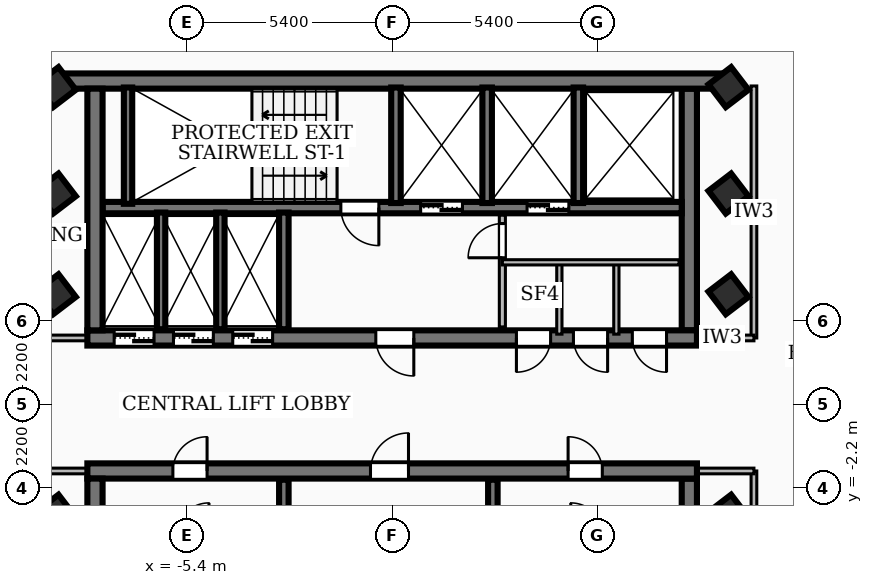
"""IFC4 building model, lengths in metres.
Left out: names, types, materials, properties, quantities, classifications, styles, units other than length and angle.
Written with IfcOpenShell. Run it as: python <this file> out.ifc"""

import sys

from ifc_helpers import new_model, si_unit, direction, frame, frame_2d, origin, origin_2d, place, context, subcontext, project, spatial, rectangle, extrude, element, fill, save


model = new_model("IFC4")
c1 = context("Model", 3, precision=1e-05, world=origin(), true_north=direction((0.0, 1.0)))
c2 = subcontext(c1, "Body", "Model", "MODEL_VIEW")
j1 = project(units=[si_unit("LENGTHUNIT", "METRE"), si_unit("PLANEANGLEUNIT", "RADIAN")], contexts=[c1])
p1 = place(None, origin())
s1 = spatial("IfcSite", under=j1, at=p1, CompositionType="ELEMENT")
p2 = place(p1, origin())
s2 = spatial("IfcBuilding", under=s1, at=p2, CompositionType="ELEMENT")
p3 = place(p2, frame((0.0, 0.0, 232.56)))
s3 = spatial("IfcBuildingStorey", under=s2, at=p3, CompositionType="ELEMENT", Elevation=232.56)
p4 = place(p3, frame((-8.78, 8.51, 0.0), z_axis=(0.0, 0.0, 1.0), x_axis=(1.0, 0.0, 0.0)))
e1 = element("IfcWall", 1, at=p4, inside=s3, PredefinedType="SHEAR", context=c2, shape_type="SweptSolid", body=[
    extrude(rectangle(XDim=17.56, YDim=0.4, at=frame_2d((8.78, 0.0))), origin(), (0.0, 0.0, 1.0), 3.14),
])
p5 = place(p3, frame((8.02, 1.75, 0.0), z_axis=(0.0, 0.0, 1.0), x_axis=(-1.0, 0.0, 0.0)))
e2 = element("IfcWall", 2, at=p5, inside=s3, PredefinedType="SHEAR", context=c2, shape_type="SweptSolid", body=[
    extrude(rectangle(XDim=16.04, YDim=0.4, at=frame_2d((8.02, 0.0))), origin(), (0.0, 0.0, 1.0), 3.14),
])
p6 = place(p5, frame((7.45, 0.0, 0.0)))
e3 = element("IfcOpeningElement", 3, at=p6, cuts=e2, PredefinedType="OPENING", context=c2, shape_type="SweptSolid", body=[
    extrude(rectangle(XDim=1.0, YDim=2.1, at=frame_2d((0.5, 1.05))), frame((0.0, 0.21, 0.0), z_axis=(0.0, -1.0, 0.0), x_axis=(1.0, 0.0, 0.0)), (0.0, 0.0, 1.0), 0.42),
])
p7 = place(p5, frame((14.285, 0.0, 0.0)))
e4 = element("IfcOpeningElement", 4, at=p7, cuts=e2, PredefinedType="OPENING", context=c2, shape_type="SweptSolid", body=[
    extrude(rectangle(XDim=1.05, YDim=2.15, at=frame_2d((0.525, 1.075))), frame((0.0, 0.21, 0.0), z_axis=(0.0, -1.0, 0.0), x_axis=(1.0, 0.0, 0.0)), (0.0, 0.0, 1.0), 0.42),
])
p8 = place(p5, frame((12.725, 0.0, 0.0)))
e5 = element("IfcOpeningElement", 5, at=p8, cuts=e2, PredefinedType="OPENING", context=c2, shape_type="SweptSolid", body=[
    extrude(rectangle(XDim=1.05, YDim=2.15, at=frame_2d((0.525, 1.075))), frame((0.0, 0.21, 0.0), z_axis=(0.0, -1.0, 0.0), x_axis=(1.0, 0.0, 0.0)), (0.0, 0.0, 1.0), 0.42),
])
p9 = place(p5, frame((11.165, 0.0, 0.0)))
e6 = element("IfcOpeningElement", 6, at=p9, cuts=e2, PredefinedType="OPENING", context=c2, shape_type="SweptSolid", body=[
    extrude(rectangle(XDim=1.05, YDim=2.15, at=frame_2d((0.525, 1.075))), frame((0.0, 0.21, 0.0), z_axis=(0.0, -1.0, 0.0), x_axis=(1.0, 0.0, 0.0)), (0.0, 0.0, 1.0), 0.42),
])
p10 = place(p5, frame((3.85, 0.0, 0.0)))
e7 = element("IfcOpeningElement", 7, at=p10, cuts=e2, PredefinedType="OPENING", context=c2, shape_type="SweptSolid", body=[
    extrude(rectangle(XDim=0.9, YDim=2.06, at=frame_2d((0.45, 1.03))), frame((0.0, 0.21, 0.0), z_axis=(0.0, -1.0, 0.0), x_axis=(1.0, 0.0, 0.0)), (0.0, 0.0, 1.0), 0.42),
])
p11 = place(p5, frame((2.35, 0.0, 0.0)))
e8 = element("IfcOpeningElement", 8, at=p11, cuts=e2, PredefinedType="OPENING", context=c2, shape_type="SweptSolid", body=[
    extrude(rectangle(XDim=0.9, YDim=2.06, at=frame_2d((0.45, 1.03))), frame((0.0, 0.21, 0.0), z_axis=(0.0, -1.0, 0.0), x_axis=(1.0, 0.0, 0.0)), (0.0, 0.0, 1.0), 0.42),
])
p12 = place(p5, frame((0.8, 0.0, 0.0)))
e9 = element("IfcOpeningElement", 9, at=p12, cuts=e2, PredefinedType="OPENING", context=c2, shape_type="SweptSolid", body=[
    extrude(rectangle(XDim=0.9, YDim=2.06, at=frame_2d((0.45, 1.03))), frame((0.0, 0.21, 0.0), z_axis=(0.0, -1.0, 0.0), x_axis=(1.0, 0.0, 0.0)), (0.0, 0.0, 1.0), 0.42),
])
for number, where, z_axis, x_axis in (
    (10, (-7.82, 1.95, 0.0), (0.0, 0.0, 1.0), (0.0, 1.0, 0.0)),
    (11, (7.82, 8.31, 0.0), (0.0, 0.0, 1.0), (0.0, -1.0, 0.0)),
):
    element("IfcWall", number, at=place(p3, frame(where, z_axis=z_axis, x_axis=x_axis)), inside=s3, PredefinedType="SHEAR", context=c2, shape_type="SweptSolid", body=[
        extrude(rectangle(XDim=6.36, YDim=0.4, at=frame_2d((3.18, 0.0))), origin(), (0.0, 0.0, 1.0), 3.14),
    ])
p13 = place(p3, frame((7.62, 5.18, 0.0), z_axis=(0.0, 0.0, 1.0), x_axis=(-1.0, 0.0, 0.0)))
e12 = element("IfcWall", 12, at=p13, inside=s3, PredefinedType="SOLIDWALL", context=c2, shape_type="SweptSolid", body=[
    extrude(rectangle(XDim=15.24, YDim=0.3, at=frame_2d((7.62, 0.0))), origin(), (0.0, 0.0, 1.0), 3.14),
])
p14 = place(p13, frame((5.77, 0.0, 0.0)))
e13 = element("IfcOpeningElement", 13, at=p14, cuts=e12, PredefinedType="OPENING", context=c2, shape_type="SweptSolid", body=[
    extrude(rectangle(XDim=1.1, YDim=2.15, at=frame_2d((0.55, 1.075))), frame((0.0, 0.16, 0.0), z_axis=(0.0, -1.0, 0.0), x_axis=(1.0, 0.0, 0.0)), (0.0, 0.0, 1.0), 0.32),
])
p15 = place(p13, frame((2.97, 0.0, 0.0)))
e14 = element("IfcOpeningElement", 14, at=p15, cuts=e12, PredefinedType="OPENING", context=c2, shape_type="SweptSolid", body=[
    extrude(rectangle(XDim=1.1, YDim=2.15, at=frame_2d((0.55, 1.075))), frame((0.0, 0.16, 0.0), z_axis=(0.0, -1.0, 0.0), x_axis=(1.0, 0.0, 0.0)), (0.0, 0.0, 1.0), 0.32),
])
p16 = place(p13, frame((7.97, 0.0, 0.0)))
e15 = element("IfcOpeningElement", 15, at=p16, cuts=e12, PredefinedType="OPENING", context=c2, shape_type="SweptSolid", body=[
    extrude(rectangle(XDim=1.0, YDim=2.1, at=frame_2d((0.5, 1.05))), frame((0.0, 0.16, 0.0), z_axis=(0.0, -1.0, 0.0), x_axis=(1.0, 0.0, 0.0)), (0.0, 0.0, 1.0), 0.32),
])
p17 = place(p3, frame((-8.02, -1.75, 0.0), z_axis=(0.0, 0.0, 1.0), x_axis=(1.0, 0.0, 0.0)))
e16 = element("IfcWall", 16, at=p17, inside=s3, PredefinedType="SHEAR", context=c2, shape_type="SweptSolid", body=[
    extrude(rectangle(XDim=16.04, YDim=0.4, at=frame_2d((8.02, 0.0))), origin(), (0.0, 0.0, 1.0), 3.14),
])
p18 = place(p17, frame((7.45, 0.0, 0.0)))
e17 = element("IfcOpeningElement", 17, at=p18, cuts=e16, PredefinedType="OPENING", context=c2, shape_type="SweptSolid", body=[
    extrude(rectangle(XDim=1.0, YDim=2.1, at=frame_2d((0.5, 1.05))), frame((0.0, 0.21, 0.0), z_axis=(0.0, -1.0, 0.0), x_axis=(1.0, 0.0, 0.0)), (0.0, 0.0, 1.0), 0.42),
])
p19 = place(p17, frame((12.65, 0.0, 0.0)))
e18 = element("IfcOpeningElement", 18, at=p19, cuts=e16, PredefinedType="OPENING", context=c2, shape_type="SweptSolid", body=[
    extrude(rectangle(XDim=0.9, YDim=2.06, at=frame_2d((0.45, 1.03))), frame((0.0, 0.21, 0.0), z_axis=(0.0, -1.0, 0.0), x_axis=(1.0, 0.0, 0.0)), (0.0, 0.0, 1.0), 0.42),
])
p20 = place(p17, frame((2.25, 0.0, 0.0)))
e19 = element("IfcOpeningElement", 19, at=p20, cuts=e16, PredefinedType="OPENING", context=c2, shape_type="SweptSolid", body=[
    extrude(rectangle(XDim=0.9, YDim=2.06, at=frame_2d((0.45, 1.03))), frame((0.0, 0.21, 0.0), z_axis=(0.0, -1.0, 0.0), x_axis=(1.0, 0.0, 0.0)), (0.0, 0.0, 1.0), 0.42),
])
for number, where, z_axis, x_axis in (
    (20, (-7.82, -8.31, 0.0), (0.0, 0.0, 1.0), (0.0, 1.0, 0.0)),
    (21, (7.82, -1.95, 0.0), (0.0, 0.0, 1.0), (0.0, -1.0, 0.0)),
):
    element("IfcWall", number, at=place(p3, frame(where, z_axis=z_axis, x_axis=x_axis)), inside=s3, PredefinedType="SHEAR", context=c2, shape_type="SweptSolid", body=[
        extrude(rectangle(XDim=6.36, YDim=0.4, at=frame_2d((3.18, 0.0))), origin(), (0.0, 0.0, 1.0), 3.14),
    ])
p21 = place(p3, frame((-6.95, 5.28, 0.0), z_axis=(0.0, 0.0, 1.0), x_axis=(0.0, 1.0, 0.0)))
e22 = element("IfcWall", 22, at=p21, inside=s3, PredefinedType="SOLIDWALL", context=c2, shape_type="SweptSolid", body=[
    extrude(rectangle(XDim=3.06, YDim=0.22, at=frame_2d((1.53, 0.0))), origin(), (0.0, 0.0, 1.0), 3.14),
])
for number, where, z_axis, x_axis in (
    (23, (0.1, 5.3, 0.0), (0.0, 0.0, 1.0), (0.0, 1.0, 0.0)),
    (24, (2.5, 5.3, 0.0), (0.0, 0.0, 1.0), (0.0, 1.0, 0.0)),
    (25, (4.9, 5.3, 0.0), (0.0, 0.0, 1.0), (0.0, 1.0, 0.0)),
):
    element("IfcWall", number, at=place(p3, frame(where, z_axis=z_axis, x_axis=x_axis)), inside=s3, PredefinedType="SOLIDWALL", context=c2, shape_type="SweptSolid", body=[
        extrude(rectangle(XDim=3.04, YDim=0.25, at=frame_2d((1.52, 0.0))), origin(), (0.0, 0.0, 1.0), 3.14),
    ])
for number, where, z_axis, x_axis in (
    (26, (-2.85, 1.98, 0.0), (0.0, 0.0, 1.0), (0.0, 1.0, 0.0)),
    (27, (-2.85, -5.05, 0.0), (0.0, 0.0, 1.0), (0.0, 1.0, 0.0)),
    (28, (2.65, -5.05, 0.0), (0.0, 0.0, 1.0), (0.0, 1.0, 0.0)),
):
    element("IfcWall", number, at=place(p3, frame(where, z_axis=z_axis, x_axis=x_axis)), inside=s3, PredefinedType="SOLIDWALL", context=c2, shape_type="SweptSolid", body=[
        extrude(rectangle(XDim=3.07, YDim=0.25, at=frame_2d((1.535, 0.0))), origin(), (0.0, 0.0, 1.0), 3.14),
    ])
for number, where, z_axis, x_axis in (
    (29, (-6.08, 1.98, 0.0), (0.0, 0.0, 1.0), (0.0, 1.0, 0.0)),
    (30, (-4.52, 1.98, 0.0), (0.0, 0.0, 1.0), (0.0, 1.0, 0.0)),
):
    element("IfcWall", number, at=place(p3, frame(where, z_axis=z_axis, x_axis=x_axis)), inside=s3, PredefinedType="SOLIDWALL", context=c2, shape_type="SweptSolid", body=[
        extrude(rectangle(XDim=3.07, YDim=0.22, at=frame_2d((1.535, 0.0))), origin(), (0.0, 0.0, 1.0), 3.14),
    ])
for number, where, z_axis, x_axis in (
    (31, (-8.85, -2.9, 0.0), (0.0, 0.0, 1.0), (0.794, 0.607, 0.0)),
    (32, (-8.85, 2.9, 0.0), (0.0, 0.0, 1.0), (0.794, 0.607, 0.0)),
    (33, (-8.85, 5.55, 0.0), (0.0, 0.0, 1.0), (0.794, 0.607, 0.0)),
    (34, (8.85, -2.9, 0.0), (0.0, 0.0, 1.0), (0.794, 0.607, 0.0)),
    (35, (8.85, 2.9, 0.0), (0.0, 0.0, 1.0), (0.794, 0.607, 0.0)),
    (36, (8.85, 5.55, 0.0), (0.0, 0.0, 1.0), (0.794, 0.607, 0.0)),
    (37, (-8.85, 8.35, 0.0), (0.0, 0.0, 1.0), (0.794, 0.607, 0.0)),
    (38, (8.85, 8.35, 0.0), (0.0, 0.0, 1.0), (0.794, 0.607, 0.0)),
):
    element("IfcColumn", number, at=place(p3, frame(where, z_axis=z_axis, x_axis=x_axis)), inside=s3, PredefinedType="COLUMN", context=c2, shape_type="SweptSolid", body=[
        extrude(rectangle(XDim=0.75, YDim=0.75, at=origin_2d()), origin(), (0.0, 0.0, 1.0), 3.42),
    ])
p22 = place(p3, frame((-3.607, -19.074, 0.0), z_axis=(0.0, 0.0, 1.0), x_axis=(-0.607353275552, 0.794431871639, 0.0)))
e39 = element("IfcWall", 39, at=p22, inside=s3, PredefinedType="SOLIDWALL", context=c2, shape_type="SweptSolid", body=[
    extrude(rectangle(XDim=25.924, YDim=0.2, at=frame_2d((12.962, 0.0))), origin(), (0.0, 0.0, 1.0), 3.14),
])
p23 = place(p22, frame((19.321, 0.0, 0.85)))
e40 = element("IfcOpeningElement", 40, at=p23, cuts=e39, PredefinedType="OPENING", context=c2, shape_type="SweptSolid", body=[
    extrude(rectangle(XDim=1.8, YDim=1.6, at=frame_2d((0.9, 0.8))), frame((0.0, 0.11, 0.0), z_axis=(0.0, -1.0, 0.0), x_axis=(1.0, 0.0, 0.0)), (0.0, 0.0, 1.0), 0.22),
])
p24 = place(p3, frame((2.9, 2.04, 0.0), z_axis=(0.0, 0.0, 1.0), x_axis=(0.0, 1.0, 0.0)))
e41 = element("IfcWall", 41, at=p24, inside=s3, PredefinedType="PARTITIONING", context=c2, shape_type="SweptSolid", body=[
    extrude(rectangle(XDim=2.94, YDim=0.16, at=frame_2d((1.47, 0.0))), origin(), (0.0, 0.0, 1.0), 2.37),
])
p25 = place(p24, frame((1.82, 0.0, 0.0)))
e42 = element("IfcOpeningElement", 42, at=p25, cuts=e41, PredefinedType="OPENING", context=c2, shape_type="SweptSolid", body=[
    extrude(rectangle(XDim=0.9, YDim=2.06, at=frame_2d((0.45, 1.03))), frame((0.0, 0.09, 0.0), z_axis=(0.0, -1.0, 0.0), x_axis=(1.0, 0.0, 0.0)), (0.0, 0.0, 1.0), 0.18),
])
p26 = place(p3, frame((2.9, 3.74, 0.0), z_axis=(0.0, 0.0, 1.0), x_axis=(1.0, 0.0, 0.0)))
e43 = element("IfcWall", 43, at=p26, inside=s3, PredefinedType="PARTITIONING", context=c2, shape_type="SweptSolid", body=[
    extrude(rectangle(XDim=4.65, YDim=0.138, at=frame_2d((2.325, 0.0))), origin(), (0.0, 0.0, 1.0), 3.14),
])
for number, where, z_axis, x_axis in (
    (44, (4.4, 1.85, 0.0), (0.0, 0.0, 1.0), (0.0, 1.0, 0.0)),
    (45, (5.9, 1.85, 0.0), (0.0, 0.0, 1.0), (0.0, 1.0, 0.0)),
):
    element("IfcWall", number, at=place(p3, frame(where, z_axis=z_axis, x_axis=x_axis)), inside=s3, PredefinedType="PARTITIONING", context=c2, shape_type="SweptSolid", body=[
        extrude(rectangle(XDim=1.89, YDim=0.138, at=frame_2d((0.945, 0.0))), origin(), (0.0, 0.0, 1.0), 2.37),
    ])
for number, where, z_axis, x_axis in (
    (46, (-7.85, 1.75, 0.0), (0.0, 0.0, 1.0), (-1.0, 0.0, 0.0)),
    (47, (-7.85, -1.75, 0.0), (0.0, 0.0, 1.0), (-1.0, 0.0, 0.0)),
):
    element("IfcWall", number, at=place(p3, frame(where, z_axis=z_axis, x_axis=x_axis)), inside=s3, PredefinedType="PARTITIONING", context=c2, shape_type="SweptSolid", body=[
        extrude(rectangle(XDim=1.67, YDim=0.15, at=frame_2d((0.835, 0.0))), origin(), (0.0, 0.0, 1.0), 2.37),
    ])
p27 = place(p3, frame((9.52, 1.75, 0.0), z_axis=(0.0, 0.0, 1.0), x_axis=(0.0, 1.0, 0.0)))
e48 = element("IfcWall", 48, at=p27, inside=s3, PredefinedType="PARTITIONING", context=c2, shape_type="SweptSolid", body=[
    extrude(rectangle(XDim=6.63, YDim=0.15, at=frame_2d((3.315, 0.0))), origin(), (0.0, 0.0, 1.0), 2.51),
])
p28 = place(p3, frame((7.85, 1.75, 0.0), z_axis=(0.0, 0.0, 1.0), x_axis=(1.0, 0.0, 0.0)))
e49 = element("IfcWall", 49, at=p28, inside=s3, PredefinedType="PARTITIONING", context=c2, shape_type="SweptSolid", body=[
    extrude(rectangle(XDim=1.67, YDim=0.15, at=frame_2d((0.835, 0.0))), origin(), (0.0, 0.0, 1.0), 2.37),
])
p29 = place(p3, frame((9.52, -8.38, 0.0), z_axis=(0.0, 0.0, 1.0), x_axis=(0.0, 1.0, 0.0)))
e50 = element("IfcWall", 50, at=p29, inside=s3, PredefinedType="PARTITIONING", context=c2, shape_type="SweptSolid", body=[
    extrude(rectangle(XDim=6.63, YDim=0.15, at=frame_2d((3.315, 0.0))), origin(), (0.0, 0.0, 1.0), 3.14),
])
p30 = place(p3, frame((7.85, -1.75, 0.0), z_axis=(0.0, 0.0, 1.0), x_axis=(1.0, 0.0, 0.0)))
e51 = element("IfcWall", 51, at=p30, inside=s3, PredefinedType="PARTITIONING", context=c2, shape_type="SweptSolid", body=[
    extrude(rectangle(XDim=1.67, YDim=0.15, at=frame_2d((0.835, 0.0))), origin(), (0.0, 0.0, 1.0), 2.37),
])
p31 = place(p3, frame((9.996, 15.491, 0.0), z_axis=(0.0, 0.0, 1.0), x_axis=(0.607384628916, -0.794407900613, 0.0)))
e52 = element("IfcWall", 52, at=p31, inside=s3, PredefinedType="PARTITIONING", context=c2, shape_type="SweptSolid", body=[
    extrude(rectangle(XDim=13.01, YDim=0.12, at=frame_2d((6.505, 0.0))), origin(), (0.0, 0.0, 1.0), 2.51),
])
p32 = place(p31, frame((6.655, 0.0, 0.0)))
e53 = element("IfcOpeningElement", 53, at=p32, cuts=e52, PredefinedType="OPENING", context=c2, shape_type="SweptSolid", body=[
    extrude(rectangle(XDim=0.86, YDim=2.04, at=frame_2d((0.43, 1.02))), frame((0.0, 0.07, 0.0), z_axis=(0.0, -1.0, 0.0), x_axis=(1.0, 0.0, 0.0)), (0.0, 0.0, 1.0), 0.14),
])
p33 = place(p31, frame((5.455, 0.0, 0.0)))
e54 = element("IfcOpeningElement", 54, at=p33, cuts=e52, PredefinedType="OPENING", context=c2, shape_type="SweptSolid", body=[
    extrude(rectangle(XDim=0.86, YDim=2.04, at=frame_2d((0.43, 1.02))), frame((0.0, 0.07, 0.0), z_axis=(0.0, -1.0, 0.0), x_axis=(1.0, 0.0, 0.0)), (0.0, 0.0, 1.0), 0.14),
])
p34 = place(p3, frame((-17.068, 4.939, 0.0), z_axis=(0.0, 0.0, 1.0), x_axis=(0.794433927634, 0.607350586255, 0.0)))
e55 = element("IfcWall", 55, at=p34, inside=s3, PredefinedType="PARTITIONING", context=c2, shape_type="SweptSolid", body=[
    extrude(rectangle(XDim=20.58, YDim=0.12, at=frame_2d((10.29, 0.0))), origin(), (0.0, 0.0, 1.0), 2.51),
])
p35 = place(p34, frame((9.96, 0.0, 0.0)))
e56 = element("IfcOpeningElement", 56, at=p35, cuts=e55, PredefinedType="OPENING", context=c2, shape_type="SweptSolid", body=[
    extrude(rectangle(XDim=1.2, YDim=2.1, at=frame_2d((0.6, 1.05))), frame((0.0, 0.07, 0.0), z_axis=(0.0, -1.0, 0.0), x_axis=(1.0, 0.0, 0.0)), (0.0, 0.0, 1.0), 0.14),
])
p36 = place(p3, frame((-4.433, 16.952, 0.0), z_axis=(0.0, 0.0, 1.0), x_axis=(-0.794407900613, -0.607384628916, 0.0)))
e57 = element("IfcWall", 57, at=p36, inside=s3, PredefinedType="PARTITIONING", context=c2, shape_type="SweptSolid", body=[
    extrude(rectangle(XDim=13.01, YDim=0.12, at=frame_2d((6.505, 0.0))), origin(), (0.0, 0.0, 1.0), 3.14),
])
p37 = place(p36, frame((5.625, 0.0, 0.0)))
e58 = element("IfcOpeningElement", 58, at=p37, cuts=e57, PredefinedType="OPENING", context=c2, shape_type="SweptSolid", body=[
    extrude(rectangle(XDim=0.86, YDim=2.04, at=frame_2d((0.43, 1.02))), frame((0.0, 0.07, 0.0), z_axis=(0.0, -1.0, 0.0), x_axis=(1.0, 0.0, 0.0)), (0.0, 0.0, 1.0), 0.14),
])
p38 = place(p36, frame((7.065, 0.0, 0.0)))
e59 = element("IfcOpeningElement", 59, at=p38, cuts=e57, PredefinedType="OPENING", context=c2, shape_type="SweptSolid", body=[
    extrude(rectangle(XDim=0.86, YDim=2.04, at=frame_2d((0.43, 1.02))), frame((0.0, 0.07, 0.0), z_axis=(0.0, -1.0, 0.0), x_axis=(1.0, 0.0, 0.0)), (0.0, 0.0, 1.0), 0.14),
])
p39 = place(p6, origin())
e60 = element("IfcDoor", 60, at=p39, inside=s3, OperationType="SINGLE_SWING_LEFT", PredefinedType="DOOR", context=c2, shape_type="SweptSolid", body=[
    extrude(rectangle(XDim=1.0, YDim=2.1, at=frame_2d((0.5, 1.05))), frame((0.0, 0.025, 0.0), z_axis=(0.0, -1.0, 0.0), x_axis=(1.0, 0.0, 0.0)), (0.0, 0.0, 1.0), 0.05),
])
fill(e3, e60)
p40 = place(p18, origin())
e61 = element("IfcDoor", 61, at=p40, inside=s3, OperationType="SINGLE_SWING_RIGHT", PredefinedType="DOOR", context=c2, shape_type="SweptSolid", body=[
    extrude(rectangle(XDim=1.0, YDim=2.1, at=frame_2d((0.5, 1.05))), frame((0.0, 0.025, 0.0), z_axis=(0.0, -1.0, 0.0), x_axis=(1.0, 0.0, 0.0)), (0.0, 0.0, 1.0), 0.05),
])
fill(e17, e61)
p41 = place(p14, origin())
e62 = element("IfcDoor", 62, at=p41, inside=s3, OperationType="DOUBLE_DOOR_SLIDING", PredefinedType="DOOR", context=c2, shape_type="SweptSolid", body=[
    extrude(rectangle(XDim=1.1, YDim=2.15, at=frame_2d((0.55, 1.075))), frame((0.0, 0.025, 0.0), z_axis=(0.0, -1.0, 0.0), x_axis=(1.0, 0.0, 0.0)), (0.0, 0.0, 1.0), 0.05),
])
fill(e13, e62)
p42 = place(p15, origin())
e63 = element("IfcDoor", 63, at=p42, inside=s3, OperationType="DOUBLE_DOOR_SLIDING", PredefinedType="DOOR", context=c2, shape_type="SweptSolid", body=[
    extrude(rectangle(XDim=1.1, YDim=2.15, at=frame_2d((0.55, 1.075))), frame((0.0, 0.025, 0.0), z_axis=(0.0, -1.0, 0.0), x_axis=(1.0, 0.0, 0.0)), (0.0, 0.0, 1.0), 0.05),
])
fill(e14, e63)
p43 = place(p16, origin())
e64 = element("IfcDoor", 64, at=p43, inside=s3, OperationType="SINGLE_SWING_LEFT", PredefinedType="DOOR", context=c2, shape_type="SweptSolid", body=[
    extrude(rectangle(XDim=1.0, YDim=2.1, at=frame_2d((0.5, 1.05))), frame((0.0, 0.025, 0.0), z_axis=(0.0, -1.0, 0.0), x_axis=(1.0, 0.0, 0.0)), (0.0, 0.0, 1.0), 0.05),
])
fill(e15, e64)
p44 = place(p7, origin())
e65 = element("IfcDoor", 65, at=p44, inside=s3, OperationType="DOUBLE_DOOR_SLIDING", PredefinedType="DOOR", context=c2, shape_type="SweptSolid", body=[
    extrude(rectangle(XDim=1.05, YDim=2.15, at=frame_2d((0.525, 1.075))), frame((0.0, 0.025, 0.0), z_axis=(0.0, -1.0, 0.0), x_axis=(1.0, 0.0, 0.0)), (0.0, 0.0, 1.0), 0.05),
])
fill(e4, e65)
p45 = place(p8, origin())
e66 = element("IfcDoor", 66, at=p45, inside=s3, OperationType="DOUBLE_DOOR_SLIDING", PredefinedType="DOOR", context=c2, shape_type="SweptSolid", body=[
    extrude(rectangle(XDim=1.05, YDim=2.15, at=frame_2d((0.525, 1.075))), frame((0.0, 0.025, 0.0), z_axis=(0.0, -1.0, 0.0), x_axis=(1.0, 0.0, 0.0)), (0.0, 0.0, 1.0), 0.05),
])
fill(e5, e66)
p46 = place(p9, origin())
e67 = element("IfcDoor", 67, at=p46, inside=s3, OperationType="DOUBLE_DOOR_SLIDING", PredefinedType="DOOR", context=c2, shape_type="SweptSolid", body=[
    extrude(rectangle(XDim=1.05, YDim=2.15, at=frame_2d((0.525, 1.075))), frame((0.0, 0.025, 0.0), z_axis=(0.0, -1.0, 0.0), x_axis=(1.0, 0.0, 0.0)), (0.0, 0.0, 1.0), 0.05),
])
fill(e6, e67)
p47 = place(p19, origin())
e68 = element("IfcDoor", 68, at=p47, inside=s3, OperationType="SINGLE_SWING_LEFT", PredefinedType="DOOR", context=c2, shape_type="SweptSolid", body=[
    extrude(rectangle(XDim=0.9, YDim=2.06, at=frame_2d((0.45, 1.03))), frame((0.0, 0.025, 0.0), z_axis=(0.0, -1.0, 0.0), x_axis=(1.0, 0.0, 0.0)), (0.0, 0.0, 1.0), 0.05),
])
fill(e18, e68)
p48 = place(p20, origin())
e69 = element("IfcDoor", 69, at=p48, inside=s3, OperationType="SINGLE_SWING_RIGHT", PredefinedType="DOOR", context=c2, shape_type="SweptSolid", body=[
    extrude(rectangle(XDim=0.9, YDim=2.06, at=frame_2d((0.45, 1.03))), frame((0.0, 0.025, 0.0), z_axis=(0.0, -1.0, 0.0), x_axis=(1.0, 0.0, 0.0)), (0.0, 0.0, 1.0), 0.05),
])
fill(e19, e69)
p49 = place(p10, origin())
e70 = element("IfcDoor", 70, at=p49, inside=s3, OperationType="SINGLE_SWING_RIGHT", PredefinedType="DOOR", context=c2, shape_type="SweptSolid", body=[
    extrude(rectangle(XDim=0.9, YDim=2.06, at=frame_2d((0.45, 1.03))), frame((0.0, 0.025, 0.0), z_axis=(0.0, -1.0, 0.0), x_axis=(1.0, 0.0, 0.0)), (0.0, 0.0, 1.0), 0.05),
])
fill(e7, e70)
p50 = place(p11, origin())
e71 = element("IfcDoor", 71, at=p50, inside=s3, OperationType="SINGLE_SWING_LEFT", PredefinedType="DOOR", context=c2, shape_type="SweptSolid", body=[
    extrude(rectangle(XDim=0.9, YDim=2.06, at=frame_2d((0.45, 1.03))), frame((0.0, 0.025, 0.0), z_axis=(0.0, -1.0, 0.0), x_axis=(1.0, 0.0, 0.0)), (0.0, 0.0, 1.0), 0.05),
])
fill(e8, e71)
p51 = place(p12, origin())
e72 = element("IfcDoor", 72, at=p51, inside=s3, OperationType="SINGLE_SWING_LEFT", PredefinedType="DOOR", context=c2, shape_type="SweptSolid", body=[
    extrude(rectangle(XDim=0.9, YDim=2.06, at=frame_2d((0.45, 1.03))), frame((0.0, 0.025, 0.0), z_axis=(0.0, -1.0, 0.0), x_axis=(1.0, 0.0, 0.0)), (0.0, 0.0, 1.0), 0.05),
])
fill(e9, e72)
p52 = place(p25, origin())
e73 = element("IfcDoor", 73, at=p52, inside=s3, OperationType="SINGLE_SWING_LEFT", PredefinedType="DOOR", context=c2, shape_type="SweptSolid", body=[
    extrude(rectangle(XDim=0.9, YDim=2.06, at=frame_2d((0.45, 1.03))), frame((0.0, 0.025, 0.0), z_axis=(0.0, -1.0, 0.0), x_axis=(1.0, 0.0, 0.0)), (0.0, 0.0, 1.0), 0.05),
])
fill(e42, e73)
save(model, sys.argv[1])
